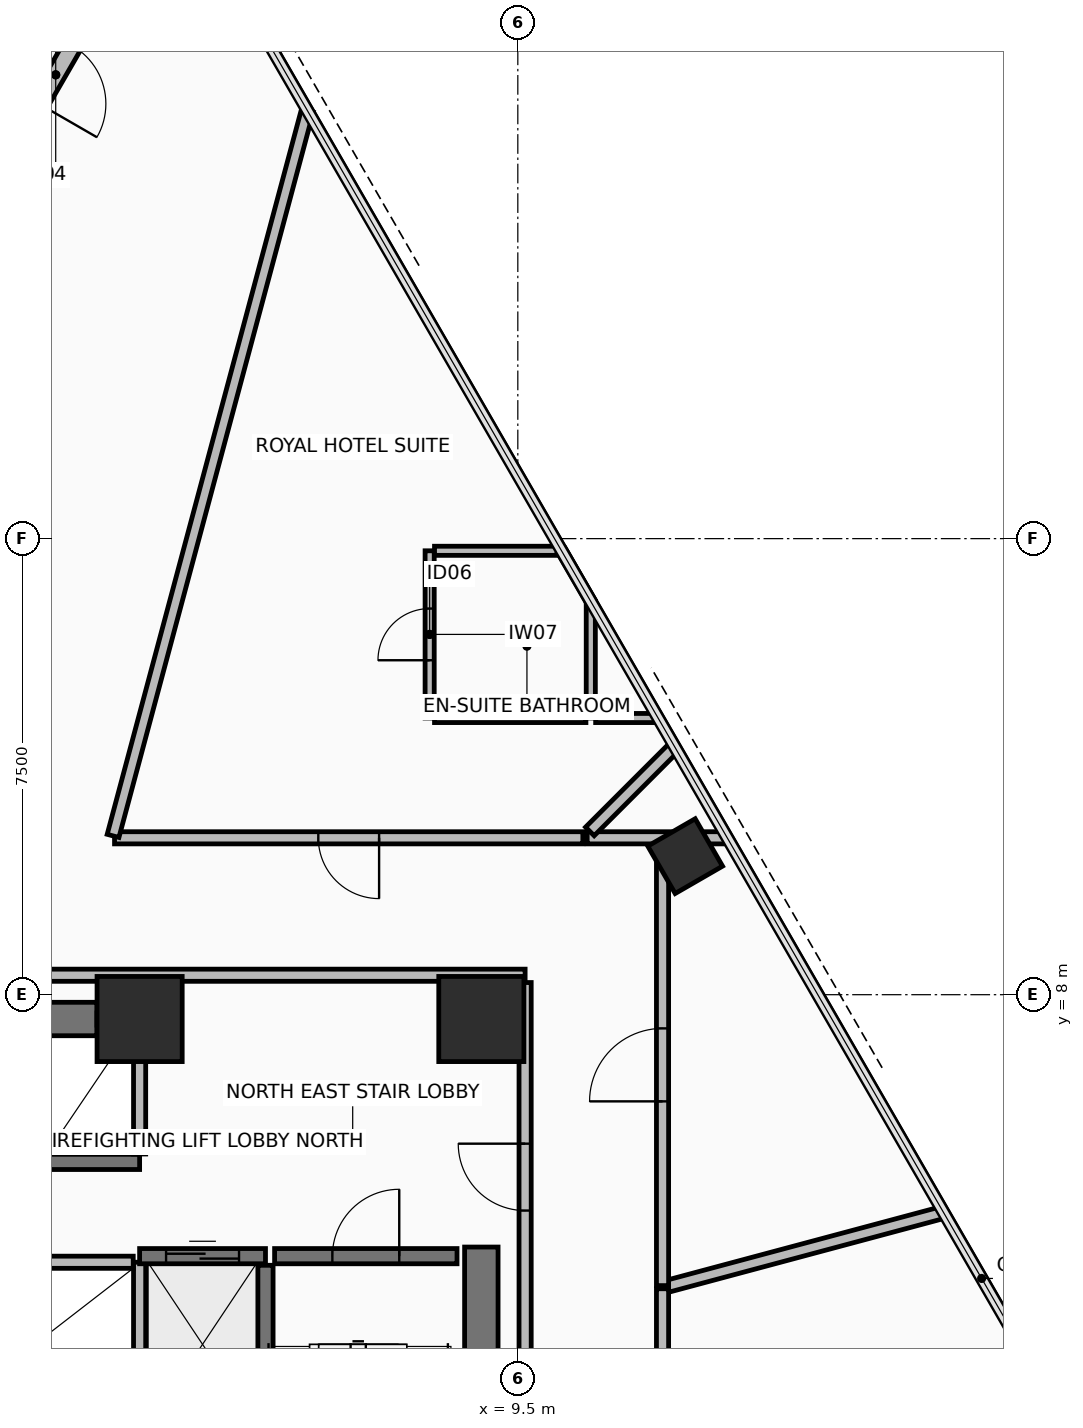
"""IFC4 building model, lengths in metres.
Left out: names, types, materials, properties, quantities, classifications, styles, units other than length and angle.
Written with IfcOpenShell. Run it as: python <this file> out.ifc"""

import sys

from ifc_helpers import new_model, si_unit, direction, frame, frame_2d, origin, origin_2d, place, context, subcontext, project, spatial, rectangle, hollow_rectangle, extrude, element, fill, save


model = new_model("IFC4")
c1 = context("Model", 3, precision=1e-05, world=origin(), true_north=direction((0.0, 1.0)))
c2 = subcontext(c1, "Body", "Model", "MODEL_VIEW")
j1 = project(units=[si_unit("LENGTHUNIT", "METRE"), si_unit("PLANEANGLEUNIT", "RADIAN")], contexts=[c1])
p1 = place(None, origin())
s1 = spatial("IfcSite", under=j1, at=p1, CompositionType="ELEMENT")
p2 = place(p1, origin())
s2 = spatial("IfcBuilding", under=s1, at=p2, CompositionType="ELEMENT")
p3 = place(p2, frame((0.0, 0.0, 48.85)))
s3 = spatial("IfcBuildingStorey", under=s2, at=p3, CompositionType="ELEMENT", Elevation=48.85)
for number, where, z_axis, x_axis in (
    (1, (8.9, 7.6, 0.0), (0.0, 0.0, 1.0), (1.0, 0.0, 0.0)),
    (2, (3.28, 7.6, 0.0), (0.0, 0.0, 1.0), (1.0, 0.0, 0.0)),
):
    element("IfcColumn", number, at=place(p3, frame(where, z_axis=z_axis, x_axis=x_axis)), inside=s3, PredefinedType="COLUMN", context=c2, shape_type="SweptSolid", body=[
        extrude(rectangle(XDim=1.4, YDim=1.4, at=origin_2d()), origin(), (0.0, 0.0, 1.0), 3.4),
    ])
p4 = place(p3, frame((12.252, 10.279, 0.0), z_axis=(0.0, 0.0, 1.0), x_axis=(-0.500001511499, 0.866024531118, 0.0)))
e3 = element("IfcColumn", 3, at=p4, inside=s3, PredefinedType="COLUMN", context=c2, shape_type="SweptSolid", body=[
    extrude(hollow_rectangle(XDim=0.9, YDim=0.9, WallThickness=0.05, at=origin_2d()), origin(), (0.0, 0.0, 1.0), 3.4),
])
p5 = place(p3, frame((3.8, 26.418, 0.0), z_axis=(0.0, 0.0, 1.0), x_axis=(-0.500005158081, -0.866022425744, 0.0)))
e4 = element("IfcWall", 4, at=p5, inside=s3, PredefinedType="STANDARD", context=c2, shape_type="SweptSolid", body=[
    extrude(rectangle(XDim=7.6, YDim=0.3, at=frame_2d((3.8, 0.0))), origin(), (0.0, 0.0, 1.0), 2.42),
])
p6 = place(p5, frame((3.25, 0.0, 0.0)))
e5 = element("IfcOpeningElement", 5, at=p6, cuts=e4, PredefinedType="OPENING", context=c2, shape_type="SweptSolid", body=[
    extrude(rectangle(XDim=1.1, YDim=2.2, at=frame_2d((0.55, 1.1))), frame((0.0, 0.16, 0.0), z_axis=(0.0, -1.0, 0.0), x_axis=(1.0, 0.0, 0.0)), (0.0, 0.0, 1.0), 0.32),
])
p7 = place(p3, frame((-2.8, 7.6, 0.0), z_axis=(0.0, 0.0, 1.0), x_axis=(1.0, 0.0, 0.0)))
e6 = element("IfcWall", 6, at=p7, inside=s3, PredefinedType="SHEAR", context=c2, shape_type="SweptSolid", body=[
    extrude(rectangle(XDim=5.38, YDim=0.55, at=frame_2d((2.69, 0.0))), origin(), (0.0, 0.0, 1.0), 3.225),
])
p8 = place(p3, frame((8.9, -6.85, 0.0), z_axis=(0.0, 0.0, 1.0), x_axis=(0.0, 1.0, 0.0)))
e7 = element("IfcWall", 7, at=p8, inside=s3, PredefinedType="SHEAR", context=c2, shape_type="SweptSolid", body=[
    extrude(rectangle(XDim=10.7, YDim=0.55, at=frame_2d((5.35, 0.0))), origin(), (0.0, 0.0, 1.0), 3.225),
])
p9 = place(p3, frame((9.62, 8.32, 0.0), z_axis=(0.0, 0.0, 1.0), x_axis=(-1.0, 0.0, 0.0)))
e8 = element("IfcWall", 8, at=p9, inside=s3, PredefinedType="PARTITIONING", context=c2, shape_type="SweptSolid", body=[
    extrude(rectangle(XDim=19.24, YDim=0.2, at=frame_2d((9.62, 0.0))), origin(), (0.0, 0.0, 1.0), 2.57),
])
p10 = place(p9, frame((14.22, 0.0, 0.0)))
e9 = element("IfcOpeningElement", 9, at=p10, cuts=e8, PredefinedType="OPENING", context=c2, shape_type="SweptSolid", body=[
    extrude(rectangle(XDim=0.9, YDim=2.1, at=frame_2d((0.45, 1.05))), frame((0.0, 0.11, 0.0), z_axis=(0.0, -1.0, 0.0), x_axis=(1.0, 0.0, 0.0)), (0.0, 0.0, 1.0), 0.22),
])
p11 = place(p3, frame((9.62, -8.2, 0.0), z_axis=(0.0, 0.0, 1.0), x_axis=(0.0, 1.0, 0.0)))
e10 = element("IfcWall", 10, at=p11, inside=s3, PredefinedType="PARTITIONING", context=c2, shape_type="SweptSolid", body=[
    extrude(rectangle(XDim=16.4, YDim=0.2, at=frame_2d((8.2, 0.0))), origin(), (0.0, 0.0, 1.0), 2.62),
])
p12 = place(p11, frame((12.65, 0.0, 0.0)))
e11 = element("IfcOpeningElement", 11, at=p12, cuts=e10, PredefinedType="OPENING", context=c2, shape_type="SweptSolid", body=[
    extrude(rectangle(XDim=1.1, YDim=2.15, at=frame_2d((0.55, 1.075))), frame((0.0, 0.11, 0.0), z_axis=(0.0, -1.0, 0.0), x_axis=(1.0, 0.0, 0.0)), (0.0, 0.0, 1.0), 0.22),
])
p13 = place(p3, frame((5.35, -3.75, 0.0), z_axis=(0.0, 0.0, 1.0), x_axis=(0.0, 1.0, 0.0)))
e12 = element("IfcWall", 12, at=p13, inside=s3, PredefinedType="SHEAR", context=c2, shape_type="SweptSolid", body=[
    extrude(rectangle(XDim=7.3, YDim=0.25, at=frame_2d((3.65, 0.0))), origin(), (0.0, 0.0, 1.0), 3.225),
])
p14 = place(p3, frame((5.5, 3.7, 0.0), z_axis=(0.0, 0.0, 1.0), x_axis=(1.0, 0.0, 0.0)))
e13 = element("IfcWall", 13, at=p14, inside=s3, PredefinedType="SHEAR", context=c2, shape_type="SweptSolid", body=[
    extrude(rectangle(XDim=3.0, YDim=0.25, at=frame_2d((1.5, 0.0))), origin(), (0.0, 0.0, 1.0), 3.225),
])
p15 = place(p14, frame((0.95, 0.0, 0.0)))
e14 = element("IfcOpeningElement", 14, at=p15, cuts=e13, PredefinedType="OPENING", context=c2, shape_type="SweptSolid", body=[
    extrude(rectangle(XDim=1.1, YDim=2.15, at=frame_2d((0.55, 1.075))), frame((0.0, 0.135, 0.0), z_axis=(0.0, -1.0, 0.0), x_axis=(1.0, 0.0, 0.0)), (0.0, 0.0, 1.0), 0.27),
])
p16 = place(p3, frame((1.637, 5.25, 0.0), z_axis=(0.0, 0.0, 1.0), x_axis=(1.0, 0.0, 0.0)))
e15 = element("IfcWall", 15, at=p16, inside=s3, PredefinedType="SHEAR", context=c2, shape_type="SweptSolid", body=[
    extrude(rectangle(XDim=1.643, YDim=0.25, at=frame_2d((0.821, 0.0))), origin(), (0.0, 0.0, 1.0), 3.225),
])
p17 = place(p3, frame((2.58, 7.6, 0.0), z_axis=(0.0, 0.0, 1.0), x_axis=(1.0, 0.0, 0.0)))
e16 = element("IfcWall", 16, at=p17, inside=s3, PredefinedType="PARTITIONING", context=c2, shape_type="SweptSolid", body=[
    extrude(rectangle(XDim=0.7, YDim=0.2, at=frame_2d((0.35, 0.0))), origin(), (0.0, 0.0, 1.0), 2.42),
])
p18 = place(p3, frame((3.28, 5.38, 0.0), z_axis=(0.0, 0.0, 1.0), x_axis=(0.0, 1.0, 0.0)))
e17 = element("IfcWall", 17, at=p18, inside=s3, PredefinedType="PARTITIONING", context=c2, shape_type="SweptSolid", body=[
    extrude(rectangle(XDim=2.115, YDim=0.2, at=frame_2d((1.058, 0.0))), origin(), (0.0, 0.0, 1.0), 2.42),
])
p19 = place(p3, frame((3.28, 1.8, 0.0), z_axis=(0.0, 0.0, 1.0), x_axis=(0.0, 1.0, 0.0)))
e18 = element("IfcWall", 18, at=p19, inside=s3, PredefinedType="PARTITIONING", context=c2, shape_type="SweptSolid", body=[
    extrude(rectangle(XDim=1.8, YDim=0.2, at=frame_2d((0.9, 0.0))), origin(), (0.0, 0.0, 1.0), 3.225),
])
p20 = place(p3, frame((1.13, 3.6, 0.0), z_axis=(0.0, 0.0, 1.0), x_axis=(1.0, 0.0, 0.0)))
e19 = element("IfcWall", 19, at=p20, inside=s3, PredefinedType="PARTITIONING", context=c2, shape_type="SweptSolid", body=[
    extrude(rectangle(XDim=2.045, YDim=0.2, at=frame_2d((1.022, 0.0))), origin(), (0.0, 0.0, 1.0), 2.42),
])
p21 = place(p3, frame((3.28, 3.7, 0.0), z_axis=(0.0, 0.0, 1.0), x_axis=(1.0, 0.0, 0.0)))
e20 = element("IfcWall", 20, at=p21, inside=s3, PredefinedType="SHEAR", context=c2, shape_type="SweptSolid", body=[
    extrude(rectangle(XDim=2.07, YDim=0.25, at=frame_2d((1.035, 0.0))), origin(), (0.0, 0.0, 1.0), 3.225),
])
p22 = place(p21, frame((0.435, 0.0, 0.0)))
e21 = element("IfcOpeningElement", 21, at=p22, cuts=e20, PredefinedType="OPENING", context=c2, shape_type="SweptSolid", body=[
    extrude(rectangle(XDim=1.2, YDim=2.2, at=frame_2d((0.6, 1.1))), frame((0.0, 0.135, 0.0), z_axis=(0.0, -1.0, 0.0), x_axis=(1.0, 0.0, 0.0)), (0.0, 0.0, 1.0), 0.27),
])
p23 = place(p3, frame((8.05, 12.55, 0.0), z_axis=(0.0, 0.0, 1.0), x_axis=(0.0, 1.0, 0.0)))
e22 = element("IfcWall", 22, at=p23, inside=s3, PredefinedType="PARTITIONING", context=c2, shape_type="SweptSolid", body=[
    extrude(rectangle(XDim=2.75, YDim=0.15, at=frame_2d((1.375, 0.0))), origin(), (0.0, 0.0, 1.0), 2.82),
])
p24 = place(p23, frame((0.95, 0.0, 0.0)))
e23 = element("IfcOpeningElement", 23, at=p24, cuts=e22, PredefinedType="OPENING", context=c2, shape_type="SweptSolid", body=[
    extrude(rectangle(XDim=0.85, YDim=2.1, at=frame_2d((0.425, 1.05))), frame((0.0, 0.085, 0.0), z_axis=(0.0, -1.0, 0.0), x_axis=(1.0, 0.0, 0.0)), (0.0, 0.0, 1.0), 0.17),
])
p25 = place(p3, frame((8.13, 15.3, 0.0), z_axis=(0.0, 0.0, 1.0), x_axis=(1.0, 0.0, 0.0)))
e24 = element("IfcWall", 24, at=p25, inside=s3, PredefinedType="PARTITIONING", context=c2, shape_type="SweptSolid", body=[
    extrude(rectangle(XDim=2.089, YDim=0.15, at=frame_2d((1.044, 0.0))), origin(), (0.0, 0.0, 1.0), 2.42),
])
p26 = place(p3, frame((10.219, 15.3, 0.0), z_axis=(0.0, 0.0, 1.0), x_axis=(0.500015396624, -0.866016514357, 0.0)))
e25 = element("IfcWall", 25, at=p26, inside=s3, PredefinedType="PARTITIONING", context=c2, shape_type="SweptSolid", body=[
    extrude(rectangle(XDim=0.962, YDim=0.15, at=frame_2d((0.481, 0.0))), origin(), (0.0, 0.0, 1.0), 3.225),
])
p27 = place(p3, frame((10.7, 14.467, 0.0), z_axis=(0.0, 0.0, 1.0), x_axis=(0.0, -1.0, 0.0)))
e26 = element("IfcWall", 26, at=p27, inside=s3, PredefinedType="PARTITIONING", context=c2, shape_type="SweptSolid", body=[
    extrude(rectangle(XDim=1.917, YDim=0.15, at=frame_2d((0.958, 0.0))), origin(), (0.0, 0.0, 1.0), 2.42),
])
p28 = place(p3, frame((11.807, 12.55, 0.0), z_axis=(0.0, 0.0, 1.0), x_axis=(-1.0, 0.0, 0.0)))
e27 = element("IfcWall", 27, at=p28, inside=s3, PredefinedType="PARTITIONING", context=c2, shape_type="SweptSolid", body=[
    extrude(rectangle(XDim=1.027, YDim=0.15, at=frame_2d((0.513, 0.0))), origin(), (0.0, 0.0, 1.0), 2.42),
])
p29 = place(p3, frame((10.62, 12.55, 0.0), z_axis=(0.0, 0.0, 1.0), x_axis=(-1.0, 0.0, 0.0)))
e28 = element("IfcWall", 28, at=p29, inside=s3, PredefinedType="PARTITIONING", context=c2, shape_type="SweptSolid", body=[
    extrude(rectangle(XDim=2.49, YDim=0.15, at=frame_2d((1.245, 0.0))), origin(), (0.0, 0.0, 1.0), 2.82),
])
p30 = place(p3, frame((12.944, 10.58, 0.0), z_axis=(0.0, 0.0, 1.0), x_axis=(-1.0, 0.0, 0.0)))
e29 = element("IfcWall", 29, at=p30, inside=s3, PredefinedType="PARTITIONING", context=c2, shape_type="SweptSolid", body=[
    extrude(rectangle(XDim=2.304, YDim=0.2, at=frame_2d((1.152, 0.0))), origin(), (0.0, 0.0, 1.0), 2.42),
])
p31 = place(p3, frame((10.685, 10.685, 0.0), z_axis=(0.0, 0.0, 1.0), x_axis=(0.707106781187, 0.707106781187, 0.0)))
e30 = element("IfcWall", 30, at=p31, inside=s3, PredefinedType="PARTITIONING", context=c2, shape_type="SweptSolid", body=[
    extrude(rectangle(XDim=1.971, YDim=0.2, at=frame_2d((0.986, 0.0))), origin(), (0.0, 0.0, 1.0), 2.42),
])
p32 = place(p3, frame((16.5, 4.421, 0.0), z_axis=(0.0, 0.0, 1.0), x_axis=(-0.965923733473, -0.258826855473, 0.0)))
e31 = element("IfcWall", 31, at=p32, inside=s3, PredefinedType="PARTITIONING", context=c2, shape_type="SweptSolid", body=[
    extrude(rectangle(XDim=4.75, YDim=0.2, at=frame_2d((2.375, 0.0))), origin(), (0.0, 0.0, 1.0), 2.42),
])
p33 = place(p3, frame((11.88, 3.216, 0.0), z_axis=(0.0, 0.0, 1.0), x_axis=(0.0, 1.0, 0.0)))
e32 = element("IfcWall", 32, at=p33, inside=s3, PredefinedType="PARTITIONING", context=c2, shape_type="SweptSolid", body=[
    extrude(rectangle(XDim=7.259, YDim=0.2, at=frame_2d((3.63, 0.0))), origin(), (0.0, 0.0, 1.0), 2.42),
])
p34 = place(p33, frame((3.03, 0.0, 0.0)))
e33 = element("IfcOpeningElement", 33, at=p34, cuts=e32, PredefinedType="OPENING", context=c2, shape_type="SweptSolid", body=[
    extrude(rectangle(XDim=1.2, YDim=2.15, at=frame_2d((0.6, 1.075))), frame((0.0, 0.11, 0.0), z_axis=(0.0, -1.0, 0.0), x_axis=(1.0, 0.0, 0.0)), (0.0, 0.0, 1.0), 0.22),
])
p35 = place(p3, frame((10.57, 10.58, 0.0), z_axis=(0.0, 0.0, 1.0), x_axis=(-1.0, 0.0, 0.0)))
e34 = element("IfcWall", 34, at=p35, inside=s3, PredefinedType="PARTITIONING", context=c2, shape_type="SweptSolid", body=[
    extrude(rectangle(XDim=7.702, YDim=0.2, at=frame_2d((3.851, 0.0))), origin(), (0.0, 0.0, 1.0), 2.57),
])
p36 = place(p35, frame((3.351, 0.0, 0.0)))
e35 = element("IfcOpeningElement", 35, at=p36, cuts=e34, PredefinedType="OPENING", context=c2, shape_type="SweptSolid", body=[
    extrude(rectangle(XDim=1.0, YDim=2.15, at=frame_2d((0.5, 1.075))), frame((0.0, 0.11, 0.0), z_axis=(0.0, -1.0, 0.0), x_axis=(1.0, 0.0, 0.0)), (0.0, 0.0, 1.0), 0.22),
])
p37 = place(p3, frame((2.843, 10.612, 0.0), z_axis=(0.0, 0.0, 1.0), x_axis=(0.258820414837, 0.965925459269, 0.0)))
e36 = element("IfcWall", 36, at=p37, inside=s3, PredefinedType="PARTITIONING", context=c2, shape_type="SweptSolid", body=[
    extrude(rectangle(XDim=12.348, YDim=0.2, at=frame_2d((6.174, 0.0))), origin(), (0.0, 0.0, 1.0), 2.42),
])
p38 = place(p3, frame((11.88, -3.164, 0.0), z_axis=(0.0, 0.0, 1.0), x_axis=(0.0, 1.0, 0.0)))
e37 = element("IfcWall", 37, at=p38, inside=s3, PredefinedType="PARTITIONING", context=c2, shape_type="SweptSolid", body=[
    extrude(rectangle(XDim=6.328, YDim=0.2, at=frame_2d((3.164, 0.0))), origin(), (0.0, 0.0, 1.0), 3.225),
])
p39 = place(p38, frame((2.564, 0.0, 0.0)))
e38 = element("IfcOpeningElement", 38, at=p39, cuts=e37, PredefinedType="OPENING", context=c2, shape_type="SweptSolid", body=[
    extrude(rectangle(XDim=1.2, YDim=2.15, at=frame_2d((0.6, 1.075))), frame((0.0, 0.11, 0.0), z_axis=(0.0, -1.0, 0.0), x_axis=(1.0, 0.0, 0.0)), (0.0, 0.0, 1.0), 0.22),
])
p40 = place(p6, frame((1.1, 0.0, 0.0), z_axis=(0.0, 0.0, 1.0), x_axis=(-1.0, 0.0, 0.0)))
e39 = element("IfcDoor", 39, at=p40, inside=s3, OperationType="SINGLE_SWING_LEFT", PredefinedType="DOOR", context=c2, shape_type="SweptSolid", body=[
    extrude(rectangle(XDim=1.1, YDim=2.2, at=frame_2d((0.55, 1.1))), frame((0.0, 0.025, 0.0), z_axis=(0.0, -1.0, 0.0), x_axis=(1.0, 0.0, 0.0)), (0.0, 0.0, 1.0), 0.05),
])
fill(e5, e39)
p41 = place(p12, frame((1.1, 0.0, 0.0), z_axis=(0.0, 0.0, 1.0), x_axis=(-1.0, 0.0, 0.0)))
e40 = element("IfcDoor", 40, at=p41, inside=s3, OperationType="SINGLE_SWING_LEFT", PredefinedType="DOOR", context=c2, shape_type="SweptSolid", body=[
    extrude(rectangle(XDim=1.1, YDim=2.15, at=frame_2d((0.55, 1.075))), frame((0.0, 0.025, 0.0), z_axis=(0.0, -1.0, 0.0), x_axis=(1.0, 0.0, 0.0)), (0.0, 0.0, 1.0), 0.05),
])
fill(e11, e40)
p42 = place(p15, frame((1.1, 0.0, 0.0), z_axis=(0.0, 0.0, 1.0), x_axis=(-1.0, 0.0, 0.0)))
e41 = element("IfcDoor", 41, at=p42, inside=s3, OperationType="SINGLE_SWING_LEFT", PredefinedType="DOOR", context=c2, shape_type="SweptSolid", body=[
    extrude(rectangle(XDim=1.1, YDim=2.15, at=frame_2d((0.55, 1.075))), frame((0.0, 0.025, 0.0), z_axis=(0.0, -1.0, 0.0), x_axis=(1.0, 0.0, 0.0)), (0.0, 0.0, 1.0), 0.05),
])
fill(e14, e41)
p43 = place(p22, origin())
e42 = element("IfcDoor", 42, at=p43, inside=s3, OperationType="SLIDING_TO_RIGHT", PredefinedType="DOOR", context=c2, shape_type="SweptSolid", body=[
    extrude(rectangle(XDim=1.2, YDim=2.2, at=frame_2d((0.6, 1.1))), frame((0.0, 0.025, 0.0), z_axis=(0.0, -1.0, 0.0), x_axis=(1.0, 0.0, 0.0)), (0.0, 0.0, 1.0), 0.05),
])
fill(e21, e42)
p44 = place(p24, origin())
e43 = element("IfcDoor", 43, at=p44, inside=s3, OperationType="SINGLE_SWING_RIGHT", PredefinedType="DOOR", context=c2, shape_type="SweptSolid", body=[
    extrude(rectangle(XDim=0.85, YDim=2.1, at=frame_2d((0.425, 1.05))), frame((0.0, 0.025, 0.0), z_axis=(0.0, -1.0, 0.0), x_axis=(1.0, 0.0, 0.0)), (0.0, 0.0, 1.0), 0.05),
])
fill(e23, e43)
p45 = place(p34, origin())
e44 = element("IfcDoor", 44, at=p45, inside=s3, OperationType="SINGLE_SWING_LEFT", PredefinedType="DOOR", context=c2, shape_type="SweptSolid", body=[
    extrude(rectangle(XDim=1.2, YDim=2.15, at=frame_2d((0.6, 1.075))), frame((0.0, 0.025, 0.0), z_axis=(0.0, -1.0, 0.0), x_axis=(1.0, 0.0, 0.0)), (0.0, 0.0, 1.0), 0.05),
])
fill(e33, e44)
p46 = place(p36, origin())
e45 = element("IfcDoor", 45, at=p46, inside=s3, OperationType="SINGLE_SWING_LEFT", PredefinedType="DOOR", context=c2, shape_type="SweptSolid", body=[
    extrude(rectangle(XDim=1.0, YDim=2.15, at=frame_2d((0.5, 1.075))), frame((0.0, 0.025, 0.0), z_axis=(0.0, -1.0, 0.0), x_axis=(1.0, 0.0, 0.0)), (0.0, 0.0, 1.0), 0.05),
])
fill(e35, e45)
save(model, sys.argv[1])
